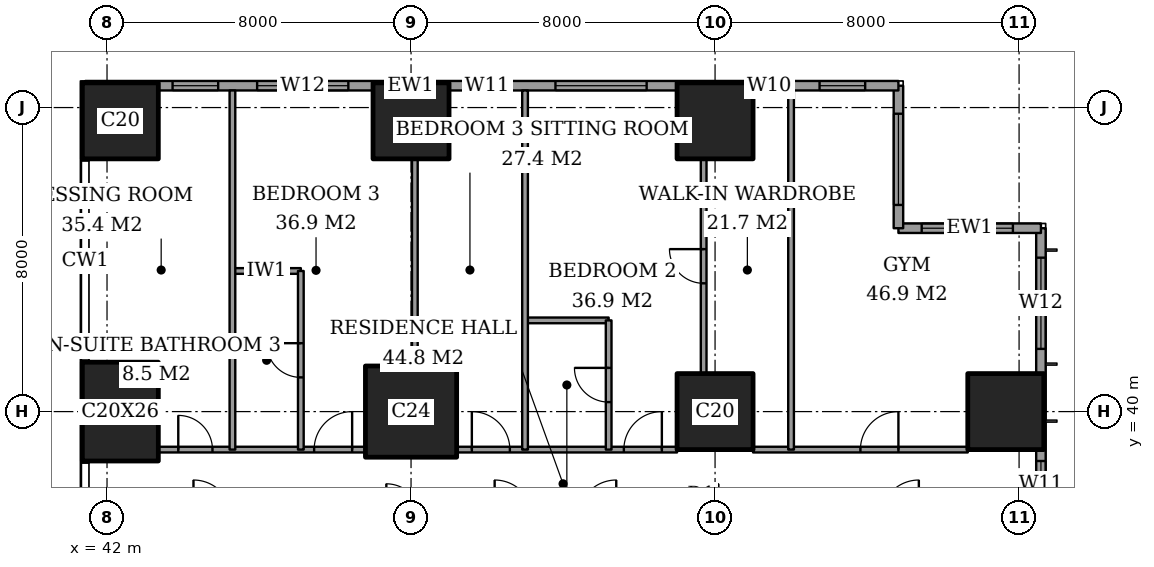
"""IFC4 building model, lengths in metres.
Left out: names, types, materials, properties, quantities, classifications, styles, units other than length and angle.
Written with IfcOpenShell. Run it as: python <this file> out.ifc"""

import sys

from ifc_helpers import new_model, si_unit, direction, frame, frame_2d, origin, origin_2d, place, context, subcontext, project, spatial, rectangle, extrude, element, fill, save


model = new_model("IFC4")
c1 = context("Model", 3, precision=1e-05, world=origin(), true_north=direction((0.0, 1.0)))
c2 = subcontext(c1, "Body", "Model", "MODEL_VIEW")
j1 = project(units=[si_unit("LENGTHUNIT", "METRE"), si_unit("PLANEANGLEUNIT", "RADIAN")], contexts=[c1])
p1 = place(None, origin())
s1 = spatial("IfcSite", under=j1, at=p1, CompositionType="ELEMENT")
p2 = place(p1, origin())
s2 = spatial("IfcBuilding", under=s1, at=p2, CompositionType="ELEMENT")
p3 = place(p2, frame((0.0, 0.0, 143.0)))
s3 = spatial("IfcBuildingStorey", under=s2, at=p3, CompositionType="ELEMENT", Elevation=143.0)
p4 = place(p3, frame((42.35, 40.0, 0.0), z_axis=(0.0, 0.0, 1.0), x_axis=(1.0, 0.0, 0.0)))
e1 = element("IfcColumn", 1, at=p4, inside=s3, PredefinedType="COLUMN", context=c2, shape_type="SweptSolid", body=[
    extrude(rectangle(XDim=2.0, YDim=2.6, at=origin_2d()), origin(), (0.0, 0.0, 1.0), 3.6),
])
p5 = place(p3, frame((42.35, 47.65, 0.0), z_axis=(0.0, 0.0, 1.0), x_axis=(1.0, 0.0, 0.0)))
e2 = element("IfcColumn", 2, at=p5, inside=s3, PredefinedType="COLUMN", context=c2, shape_type="SweptSolid", body=[
    extrude(rectangle(XDim=2.0, YDim=2.0, at=origin_2d()), origin(), (0.0, 0.0, 1.0), 3.6),
])
p6 = place(p3, frame((50.0, 40.0, 0.0), z_axis=(0.0, 0.0, 1.0), x_axis=(1.0, 0.0, 0.0)))
e3 = element("IfcColumn", 3, at=p6, inside=s3, PredefinedType="COLUMN", context=c2, shape_type="SweptSolid", body=[
    extrude(rectangle(XDim=2.4, YDim=2.4, at=origin_2d()), origin(), (0.0, 0.0, 1.0), 3.6),
])
for number, where, z_axis, x_axis in (
    (4, (50.0, 47.65, 0.0), (0.0, 0.0, 1.0), (1.0, 0.0, 0.0)),
    (5, (58.0, 40.0, 0.0), (0.0, 0.0, 1.0), (1.0, 0.0, 0.0)),
    (6, (58.0, 47.65, 0.0), (0.0, 0.0, 1.0), (1.0, 0.0, 0.0)),
    (7, (65.65, 40.0, 0.0), (0.0, 0.0, 1.0), (1.0, 0.0, 0.0)),
):
    element("IfcColumn", number, at=place(p3, frame(where, z_axis=z_axis, x_axis=x_axis)), inside=s3, PredefinedType="COLUMN", context=c2, shape_type="SweptSolid", body=[
        extrude(rectangle(XDim=2.0, YDim=2.0, at=origin_2d()), origin(), (0.0, 0.0, 1.0), 3.6),
    ])
p7 = place(p3, frame((66.575, 3.175, 0.0), z_axis=(0.0, 0.0, 1.0), x_axis=(0.0, 1.0, 0.0)))
e8 = element("IfcWall", 8, at=p7, inside=s3, PredefinedType="SOLIDWALL", context=c2, shape_type="SweptSolid", body=[
    extrude(rectangle(XDim=41.65, YDim=0.25, at=frame_2d((20.825, 0.0))), origin(), (0.0, 0.0, 1.0), 3.6),
])
p8 = place(p7, frame((0.775, 0.0, 0.4)))
e9 = element("IfcOpeningElement", 9, at=p8, cuts=e8, PredefinedType="OPENING", context=c2, shape_type="SweptSolid", body=[
    extrude(rectangle(XDim=2.4, YDim=2.2, at=frame_2d((1.2, 1.1))), frame((0.0, 0.135, 0.0), z_axis=(0.0, -1.0, 0.0), x_axis=(1.0, 0.0, 0.0)), (0.0, 0.0, 1.0), 0.27),
])
p9 = place(p7, frame((6.1, 0.0, 0.4)))
e10 = element("IfcOpeningElement", 10, at=p9, cuts=e8, PredefinedType="OPENING", context=c2, shape_type="SweptSolid", body=[
    extrude(rectangle(XDim=1.2, YDim=2.2, at=frame_2d((0.6, 1.1))), frame((0.0, 0.135, 0.0), z_axis=(0.0, -1.0, 0.0), x_axis=(1.0, 0.0, 0.0)), (0.0, 0.0, 1.0), 0.27),
])
p10 = place(p7, frame((8.275, 0.0, 0.4)))
e11 = element("IfcOpeningElement", 11, at=p10, cuts=e8, PredefinedType="OPENING", context=c2, shape_type="SweptSolid", body=[
    extrude(rectangle(XDim=2.4, YDim=2.2, at=frame_2d((1.2, 1.1))), frame((0.0, 0.135, 0.0), z_axis=(0.0, -1.0, 0.0), x_axis=(1.0, 0.0, 0.0)), (0.0, 0.0, 1.0), 0.27),
])
p11 = place(p7, frame((15.775, 0.0, 0.4)))
e12 = element("IfcOpeningElement", 12, at=p11, cuts=e8, PredefinedType="OPENING", context=c2, shape_type="SweptSolid", body=[
    extrude(rectangle(XDim=2.4, YDim=2.2, at=frame_2d((1.2, 1.1))), frame((0.0, 0.135, 0.0), z_axis=(0.0, -1.0, 0.0), x_axis=(1.0, 0.0, 0.0)), (0.0, 0.0, 1.0), 0.27),
])
p12 = place(p7, frame((23.475, 0.0, 0.4)))
e13 = element("IfcOpeningElement", 13, at=p12, cuts=e8, PredefinedType="OPENING", context=c2, shape_type="SweptSolid", body=[
    extrude(rectangle(XDim=2.4, YDim=2.2, at=frame_2d((1.2, 1.1))), frame((0.0, 0.135, 0.0), z_axis=(0.0, -1.0, 0.0), x_axis=(1.0, 0.0, 0.0)), (0.0, 0.0, 1.0), 0.27),
])
p13 = place(p7, frame((30.875, 0.0, 0.4)))
e14 = element("IfcOpeningElement", 14, at=p13, cuts=e8, PredefinedType="OPENING", context=c2, shape_type="SweptSolid", body=[
    extrude(rectangle(XDim=2.4, YDim=2.2, at=frame_2d((1.2, 1.1))), frame((0.0, 0.135, 0.0), z_axis=(0.0, -1.0, 0.0), x_axis=(1.0, 0.0, 0.0)), (0.0, 0.0, 1.0), 0.27),
])
p14 = place(p7, frame((34.325, 0.0, 0.4)))
e15 = element("IfcOpeningElement", 15, at=p14, cuts=e8, PredefinedType="OPENING", context=c2, shape_type="SweptSolid", body=[
    extrude(rectangle(XDim=1.2, YDim=2.2, at=frame_2d((0.6, 1.1))), frame((0.0, 0.135, 0.0), z_axis=(0.0, -1.0, 0.0), x_axis=(1.0, 0.0, 0.0)), (0.0, 0.0, 1.0), 0.27),
])
p15 = place(p7, frame((38.475, 0.0, 0.4)))
e16 = element("IfcOpeningElement", 16, at=p15, cuts=e8, PredefinedType="OPENING", context=c2, shape_type="SweptSolid", body=[
    extrude(rectangle(XDim=2.4, YDim=2.2, at=frame_2d((1.2, 1.1))), frame((0.0, 0.135, 0.0), z_axis=(0.0, -1.0, 0.0), x_axis=(1.0, 0.0, 0.0)), (0.0, 0.0, 1.0), 0.27),
])
p16 = place(p3, frame((66.575, 44.825, 0.0), z_axis=(0.0, 0.0, 1.0), x_axis=(-1.0, 0.0, 0.0)))
e17 = element("IfcWall", 17, at=p16, inside=s3, PredefinedType="SOLIDWALL", context=c2, shape_type="SweptSolid", body=[
    extrude(rectangle(XDim=3.75, YDim=0.25, at=frame_2d((1.875, 0.0))), origin(), (0.0, 0.0, 1.0), 3.6),
])
p17 = place(p16, frame((0.738, 0.0, 0.4)))
e18 = element("IfcOpeningElement", 18, at=p17, cuts=e17, PredefinedType="OPENING", context=c2, shape_type="SweptSolid", body=[
    extrude(rectangle(XDim=2.4, YDim=2.2, at=frame_2d((1.2, 1.1))), frame((0.0, 0.135, 0.0), z_axis=(0.0, -1.0, 0.0), x_axis=(1.0, 0.0, 0.0)), (0.0, 0.0, 1.0), 0.27),
])
p18 = place(p3, frame((62.825, 44.825, 0.0), z_axis=(0.0, 0.0, 1.0), x_axis=(0.0, 1.0, 0.0)))
e19 = element("IfcWall", 19, at=p18, inside=s3, PredefinedType="SOLIDWALL", context=c2, shape_type="SweptSolid", body=[
    extrude(rectangle(XDim=3.75, YDim=0.25, at=frame_2d((1.875, 0.0))), origin(), (0.0, 0.0, 1.0), 3.6),
])
p19 = place(p18, frame((0.613, 0.0, 0.4)))
e20 = element("IfcOpeningElement", 20, at=p19, cuts=e19, PredefinedType="OPENING", context=c2, shape_type="SweptSolid", body=[
    extrude(rectangle(XDim=2.4, YDim=2.2, at=frame_2d((1.2, 1.1))), frame((0.0, 0.135, 0.0), z_axis=(0.0, -1.0, 0.0), x_axis=(1.0, 0.0, 0.0)), (0.0, 0.0, 1.0), 0.27),
])
p20 = place(p3, frame((62.825, 48.575, 0.0), z_axis=(0.0, 0.0, 1.0), x_axis=(-1.0, 0.0, 0.0)))
e21 = element("IfcWall", 21, at=p20, inside=s3, PredefinedType="SOLIDWALL", context=c2, shape_type="SweptSolid", body=[
    extrude(rectangle(XDim=21.4, YDim=0.25, at=frame_2d((10.7, 0.0))), origin(), (0.0, 0.0, 1.0), 3.6),
])
p21 = place(p20, frame((0.875, 0.0, 0.4)))
e22 = element("IfcOpeningElement", 22, at=p21, cuts=e21, PredefinedType="OPENING", context=c2, shape_type="SweptSolid", body=[
    extrude(rectangle(XDim=1.2, YDim=2.2, at=frame_2d((0.6, 1.1))), frame((0.0, 0.135, 0.0), z_axis=(0.0, -1.0, 0.0), x_axis=(1.0, 0.0, 0.0)), (0.0, 0.0, 1.0), 0.27),
])
p22 = place(p20, frame((3.1, 0.0, 0.4)))
e23 = element("IfcOpeningElement", 23, at=p22, cuts=e21, PredefinedType="OPENING", context=c2, shape_type="SweptSolid", body=[
    extrude(rectangle(XDim=0.6, YDim=2.2, at=frame_2d((0.3, 1.1))), frame((0.0, 0.135, 0.0), z_axis=(0.0, -1.0, 0.0), x_axis=(1.0, 0.0, 0.0)), (0.0, 0.0, 1.0), 0.27),
])
p23 = place(p20, frame((6.625, 0.0, 0.4)))
e24 = element("IfcOpeningElement", 24, at=p23, cuts=e21, PredefinedType="OPENING", context=c2, shape_type="SweptSolid", body=[
    extrude(rectangle(XDim=2.4, YDim=2.2, at=frame_2d((1.2, 1.1))), frame((0.0, 0.135, 0.0), z_axis=(0.0, -1.0, 0.0), x_axis=(1.0, 0.0, 0.0)), (0.0, 0.0, 1.0), 0.27),
])
p24 = place(p20, frame((10.225, 0.0, 0.4)))
e25 = element("IfcOpeningElement", 25, at=p24, cuts=e21, PredefinedType="OPENING", context=c2, shape_type="SweptSolid", body=[
    extrude(rectangle(XDim=1.2, YDim=2.2, at=frame_2d((0.6, 1.1))), frame((0.0, 0.135, 0.0), z_axis=(0.0, -1.0, 0.0), x_axis=(1.0, 0.0, 0.0)), (0.0, 0.0, 1.0), 0.27),
])
p25 = place(p20, frame((14.475, 0.0, 0.4)))
e26 = element("IfcOpeningElement", 26, at=p25, cuts=e21, PredefinedType="OPENING", context=c2, shape_type="SweptSolid", body=[
    extrude(rectangle(XDim=2.4, YDim=2.2, at=frame_2d((1.2, 1.1))), frame((0.0, 0.135, 0.0), z_axis=(0.0, -1.0, 0.0), x_axis=(1.0, 0.0, 0.0)), (0.0, 0.0, 1.0), 0.27),
])
p26 = place(p20, frame((17.9, 0.0, 0.4)))
e27 = element("IfcOpeningElement", 27, at=p26, cuts=e21, PredefinedType="OPENING", context=c2, shape_type="SweptSolid", body=[
    extrude(rectangle(XDim=1.2, YDim=2.2, at=frame_2d((0.6, 1.1))), frame((0.0, 0.135, 0.0), z_axis=(0.0, -1.0, 0.0), x_axis=(1.0, 0.0, 0.0)), (0.0, 0.0, 1.0), 0.27),
])
p27 = place(p3, frame((43.35, 39.0, 0.0), z_axis=(0.0, 0.0, 1.0), x_axis=(1.0, 0.0, 0.0)))
e28 = element("IfcWall", 28, at=p27, inside=s3, PredefinedType="PARTITIONING", context=c2, shape_type="SweptSolid", body=[
    extrude(rectangle(XDim=5.45, YDim=0.15, at=frame_2d((2.725, 0.0))), origin(), (0.0, 0.0, 1.0), 3.35),
])
p28 = place(p27, frame((4.1, 0.0, 0.0)))
e29 = element("IfcOpeningElement", 29, at=p28, cuts=e28, PredefinedType="OPENING", context=c2, shape_type="SweptSolid", body=[
    extrude(rectangle(XDim=1.0, YDim=2.1, at=frame_2d((0.5, 1.05))), frame((0.0, 0.085, 0.0), z_axis=(0.0, -1.0, 0.0), x_axis=(1.0, 0.0, 0.0)), (0.0, 0.0, 1.0), 0.17),
])
p29 = place(p27, frame((0.525, 0.0, 0.0)))
e30 = element("IfcOpeningElement", 30, at=p29, cuts=e28, PredefinedType="OPENING", context=c2, shape_type="SweptSolid", body=[
    extrude(rectangle(XDim=0.9, YDim=2.1, at=frame_2d((0.45, 1.05))), frame((0.0, 0.085, 0.0), z_axis=(0.0, -1.0, 0.0), x_axis=(1.0, 0.0, 0.0)), (0.0, 0.0, 1.0), 0.17),
])
p30 = place(p3, frame((51.2, 39.0, 0.0), z_axis=(0.0, 0.0, 1.0), x_axis=(1.0, 0.0, 0.0)))
e31 = element("IfcWall", 31, at=p30, inside=s3, PredefinedType="PARTITIONING", context=c2, shape_type="SweptSolid", body=[
    extrude(rectangle(XDim=5.8, YDim=0.15, at=frame_2d((2.9, 0.0))), origin(), (0.0, 0.0, 1.0), 3.35),
])
p31 = place(p30, frame((4.4, 0.0, 0.0)))
e32 = element("IfcOpeningElement", 32, at=p31, cuts=e31, PredefinedType="OPENING", context=c2, shape_type="SweptSolid", body=[
    extrude(rectangle(XDim=1.0, YDim=2.1, at=frame_2d((0.5, 1.05))), frame((0.0, 0.085, 0.0), z_axis=(0.0, -1.0, 0.0), x_axis=(1.0, 0.0, 0.0)), (0.0, 0.0, 1.0), 0.17),
])
p32 = place(p30, frame((0.4, 0.0, 0.0)))
e33 = element("IfcOpeningElement", 33, at=p32, cuts=e31, PredefinedType="OPENING", context=c2, shape_type="SweptSolid", body=[
    extrude(rectangle(XDim=1.0, YDim=2.1, at=frame_2d((0.5, 1.05))), frame((0.0, 0.085, 0.0), z_axis=(0.0, -1.0, 0.0), x_axis=(1.0, 0.0, 0.0)), (0.0, 0.0, 1.0), 0.17),
])
p33 = place(p3, frame((59.0, 39.0, 0.0), z_axis=(0.0, 0.0, 1.0), x_axis=(1.0, 0.0, 0.0)))
e34 = element("IfcWall", 34, at=p33, inside=s3, PredefinedType="PARTITIONING", context=c2, shape_type="SweptSolid", body=[
    extrude(rectangle(XDim=5.65, YDim=0.15, at=frame_2d((2.825, 0.0))), origin(), (0.0, 0.0, 1.0), 3.35),
])
p34 = place(p33, frame((2.825, 0.0, 0.0)))
e35 = element("IfcOpeningElement", 35, at=p34, cuts=e34, PredefinedType="OPENING", context=c2, shape_type="SweptSolid", body=[
    extrude(rectangle(XDim=1.0, YDim=2.1, at=frame_2d((0.5, 1.05))), frame((0.0, 0.085, 0.0), z_axis=(0.0, -1.0, 0.0), x_axis=(1.0, 0.0, 0.0)), (0.0, 0.0, 1.0), 0.17),
])
p35 = place(p3, frame((53.0, 42.4, 0.0), z_axis=(0.0, 0.0, 1.0), x_axis=(1.0, 0.0, 0.0)))
e36 = element("IfcWall", 36, at=p35, inside=s3, PredefinedType="PARTITIONING", context=c2, shape_type="SweptSolid", body=[
    extrude(rectangle(XDim=2.2, YDim=0.15, at=frame_2d((1.1, 0.0))), origin(), (0.0, 0.0, 1.0), 3.35),
])
p36 = place(p3, frame((45.3, 43.7, 0.0), z_axis=(0.0, 0.0, 1.0), x_axis=(1.0, 0.0, 0.0)))
e37 = element("IfcWall", 37, at=p36, inside=s3, PredefinedType="PARTITIONING", context=c2, shape_type="SweptSolid", body=[
    extrude(rectangle(XDim=1.8, YDim=0.15, at=frame_2d((0.9, 0.0))), origin(), (0.0, 0.0, 1.0), 3.35),
])
p37 = place(p3, frame((45.3, 39.0, 0.0), z_axis=(0.0, 0.0, 1.0), x_axis=(0.0, 1.0, 0.0)))
e38 = element("IfcWall", 38, at=p37, inside=s3, PredefinedType="PARTITIONING", context=c2, shape_type="SweptSolid", body=[
    extrude(rectangle(XDim=9.45, YDim=0.15, at=frame_2d((4.725, 0.0))), origin(), (0.0, 0.0, 1.0), 3.35),
])
p38 = place(p3, frame((47.1, 39.0, 0.0), z_axis=(0.0, 0.0, 1.0), x_axis=(0.0, 1.0, 0.0)))
e39 = element("IfcWall", 39, at=p38, inside=s3, PredefinedType="PARTITIONING", context=c2, shape_type="SweptSolid", body=[
    extrude(rectangle(XDim=4.7, YDim=0.15, at=frame_2d((2.35, 0.0))), origin(), (0.0, 0.0, 1.0), 3.35),
])
p39 = place(p38, frame((1.9, 0.0, 0.0)))
e40 = element("IfcOpeningElement", 40, at=p39, cuts=e39, PredefinedType="OPENING", context=c2, shape_type="SweptSolid", body=[
    extrude(rectangle(XDim=0.9, YDim=2.1, at=frame_2d((0.45, 1.05))), frame((0.0, 0.085, 0.0), z_axis=(0.0, -1.0, 0.0), x_axis=(1.0, 0.0, 0.0)), (0.0, 0.0, 1.0), 0.17),
])
p40 = place(p3, frame((50.1, 41.2, 0.0), z_axis=(0.0, 0.0, 1.0), x_axis=(0.0, 1.0, 0.0)))
e41 = element("IfcWall", 41, at=p40, inside=s3, PredefinedType="PARTITIONING", context=c2, shape_type="SweptSolid", body=[
    extrude(rectangle(XDim=5.45, YDim=0.15, at=frame_2d((2.725, 0.0))), origin(), (0.0, 0.0, 1.0), 3.35),
])
p41 = place(p3, frame((53.0, 39.0, 0.0), z_axis=(0.0, 0.0, 1.0), x_axis=(0.0, 1.0, 0.0)))
e42 = element("IfcWall", 42, at=p41, inside=s3, PredefinedType="PARTITIONING", context=c2, shape_type="SweptSolid", body=[
    extrude(rectangle(XDim=9.45, YDim=0.15, at=frame_2d((4.725, 0.0))), origin(), (0.0, 0.0, 1.0), 3.35),
])
p42 = place(p3, frame((55.2, 39.0, 0.0), z_axis=(0.0, 0.0, 1.0), x_axis=(0.0, 1.0, 0.0)))
e43 = element("IfcWall", 43, at=p42, inside=s3, PredefinedType="PARTITIONING", context=c2, shape_type="SweptSolid", body=[
    extrude(rectangle(XDim=3.4, YDim=0.15, at=frame_2d((1.7, 0.0))), origin(), (0.0, 0.0, 1.0), 3.35),
])
p43 = place(p42, frame((1.25, 0.0, 0.0)))
e44 = element("IfcOpeningElement", 44, at=p43, cuts=e43, PredefinedType="OPENING", context=c2, shape_type="SweptSolid", body=[
    extrude(rectangle(XDim=0.9, YDim=2.1, at=frame_2d((0.45, 1.05))), frame((0.0, 0.085, 0.0), z_axis=(0.0, -1.0, 0.0), x_axis=(1.0, 0.0, 0.0)), (0.0, 0.0, 1.0), 0.17),
])
p44 = place(p3, frame((57.7, 41.0, 0.0), z_axis=(0.0, 0.0, 1.0), x_axis=(0.0, 1.0, 0.0)))
e45 = element("IfcWall", 45, at=p44, inside=s3, PredefinedType="PARTITIONING", context=c2, shape_type="SweptSolid", body=[
    extrude(rectangle(XDim=5.65, YDim=0.15, at=frame_2d((2.825, 0.0))), origin(), (0.0, 0.0, 1.0), 3.35),
])
p45 = place(p44, frame((2.375, 0.0, 0.0)))
e46 = element("IfcOpeningElement", 46, at=p45, cuts=e45, PredefinedType="OPENING", context=c2, shape_type="SweptSolid", body=[
    extrude(rectangle(XDim=0.9, YDim=2.1, at=frame_2d((0.45, 1.05))), frame((0.0, 0.085, 0.0), z_axis=(0.0, -1.0, 0.0), x_axis=(1.0, 0.0, 0.0)), (0.0, 0.0, 1.0), 0.17),
])
p46 = place(p3, frame((60.0, 39.0, 0.0), z_axis=(0.0, 0.0, 1.0), x_axis=(0.0, 1.0, 0.0)))
e47 = element("IfcWall", 47, at=p46, inside=s3, PredefinedType="PARTITIONING", context=c2, shape_type="SweptSolid", body=[
    extrude(rectangle(XDim=9.45, YDim=0.15, at=frame_2d((4.725, 0.0))), origin(), (0.0, 0.0, 1.0), 3.35),
])
p47 = place(p14, origin())
e48 = element("IfcWindow", 48, at=p47, inside=s3, PartitioningType="SINGLE_PANEL", PredefinedType="WINDOW", context=c2, shape_type="SweptSolid", body=[
    extrude(rectangle(XDim=1.2, YDim=2.2, at=frame_2d((0.6, 1.1))), frame((0.0, 0.03, 0.0), z_axis=(0.0, -1.0, 0.0), x_axis=(1.0, 0.0, 0.0)), (0.0, 0.0, 1.0), 0.06),
])
fill(e15, e48)
p48 = place(p15, origin())
e49 = element("IfcWindow", 49, at=p48, inside=s3, PartitioningType="SINGLE_PANEL", PredefinedType="WINDOW", context=c2, shape_type="SweptSolid", body=[
    extrude(rectangle(XDim=2.4, YDim=2.2, at=frame_2d((1.2, 1.1))), frame((0.0, 0.03, 0.0), z_axis=(0.0, -1.0, 0.0), x_axis=(1.0, 0.0, 0.0)), (0.0, 0.0, 1.0), 0.06),
])
fill(e16, e49)
p49 = place(p17, origin())
e50 = element("IfcWindow", 50, at=p49, inside=s3, PartitioningType="SINGLE_PANEL", PredefinedType="WINDOW", context=c2, shape_type="SweptSolid", body=[
    extrude(rectangle(XDim=2.4, YDim=2.2, at=frame_2d((1.2, 1.1))), frame((0.0, 0.03, 0.0), z_axis=(0.0, -1.0, 0.0), x_axis=(1.0, 0.0, 0.0)), (0.0, 0.0, 1.0), 0.06),
])
fill(e18, e50)
p50 = place(p19, origin())
e51 = element("IfcWindow", 51, at=p50, inside=s3, PartitioningType="SINGLE_PANEL", PredefinedType="WINDOW", context=c2, shape_type="SweptSolid", body=[
    extrude(rectangle(XDim=2.4, YDim=2.2, at=frame_2d((1.2, 1.1))), frame((0.0, 0.03, 0.0), z_axis=(0.0, -1.0, 0.0), x_axis=(1.0, 0.0, 0.0)), (0.0, 0.0, 1.0), 0.06),
])
fill(e20, e51)
p51 = place(p21, origin())
e52 = element("IfcWindow", 52, at=p51, inside=s3, PartitioningType="SINGLE_PANEL", PredefinedType="WINDOW", context=c2, shape_type="SweptSolid", body=[
    extrude(rectangle(XDim=1.2, YDim=2.2, at=frame_2d((0.6, 1.1))), frame((0.0, 0.03, 0.0), z_axis=(0.0, -1.0, 0.0), x_axis=(1.0, 0.0, 0.0)), (0.0, 0.0, 1.0), 0.06),
])
fill(e22, e52)
p52 = place(p22, origin())
e53 = element("IfcWindow", 53, at=p52, inside=s3, PartitioningType="SINGLE_PANEL", PredefinedType="WINDOW", context=c2, shape_type="SweptSolid", body=[
    extrude(rectangle(XDim=0.6, YDim=2.2, at=frame_2d((0.3, 1.1))), frame((0.0, 0.03, 0.0), z_axis=(0.0, -1.0, 0.0), x_axis=(1.0, 0.0, 0.0)), (0.0, 0.0, 1.0), 0.06),
])
fill(e23, e53)
p53 = place(p23, origin())
e54 = element("IfcWindow", 54, at=p53, inside=s3, PartitioningType="SINGLE_PANEL", PredefinedType="WINDOW", context=c2, shape_type="SweptSolid", body=[
    extrude(rectangle(XDim=2.4, YDim=2.2, at=frame_2d((1.2, 1.1))), frame((0.0, 0.03, 0.0), z_axis=(0.0, -1.0, 0.0), x_axis=(1.0, 0.0, 0.0)), (0.0, 0.0, 1.0), 0.06),
])
fill(e24, e54)
p54 = place(p24, origin())
e55 = element("IfcWindow", 55, at=p54, inside=s3, PartitioningType="SINGLE_PANEL", PredefinedType="WINDOW", context=c2, shape_type="SweptSolid", body=[
    extrude(rectangle(XDim=1.2, YDim=2.2, at=frame_2d((0.6, 1.1))), frame((0.0, 0.03, 0.0), z_axis=(0.0, -1.0, 0.0), x_axis=(1.0, 0.0, 0.0)), (0.0, 0.0, 1.0), 0.06),
])
fill(e25, e55)
p55 = place(p25, origin())
e56 = element("IfcWindow", 56, at=p55, inside=s3, PartitioningType="SINGLE_PANEL", PredefinedType="WINDOW", context=c2, shape_type="SweptSolid", body=[
    extrude(rectangle(XDim=2.4, YDim=2.2, at=frame_2d((1.2, 1.1))), frame((0.0, 0.03, 0.0), z_axis=(0.0, -1.0, 0.0), x_axis=(1.0, 0.0, 0.0)), (0.0, 0.0, 1.0), 0.06),
])
fill(e26, e56)
p56 = place(p26, origin())
e57 = element("IfcWindow", 57, at=p56, inside=s3, PartitioningType="SINGLE_PANEL", PredefinedType="WINDOW", context=c2, shape_type="SweptSolid", body=[
    extrude(rectangle(XDim=1.2, YDim=2.2, at=frame_2d((0.6, 1.1))), frame((0.0, 0.03, 0.0), z_axis=(0.0, -1.0, 0.0), x_axis=(1.0, 0.0, 0.0)), (0.0, 0.0, 1.0), 0.06),
])
fill(e27, e57)
p57 = place(p34, origin())
e58 = element("IfcDoor", 58, at=p57, inside=s3, OperationType="SINGLE_SWING_LEFT", PredefinedType="DOOR", context=c2, shape_type="SweptSolid", body=[
    extrude(rectangle(XDim=1.0, YDim=2.1, at=frame_2d((0.5, 1.05))), frame((0.0, 0.025, 0.0), z_axis=(0.0, -1.0, 0.0), x_axis=(1.0, 0.0, 0.0)), (0.0, 0.0, 1.0), 0.05),
])
fill(e35, e58)
p58 = place(p45, origin())
e59 = element("IfcDoor", 59, at=p58, inside=s3, OperationType="SINGLE_SWING_LEFT", PredefinedType="DOOR", context=c2, shape_type="SweptSolid", body=[
    extrude(rectangle(XDim=0.9, YDim=2.1, at=frame_2d((0.45, 1.05))), frame((0.0, 0.025, 0.0), z_axis=(0.0, -1.0, 0.0), x_axis=(1.0, 0.0, 0.0)), (0.0, 0.0, 1.0), 0.05),
])
fill(e46, e59)
p59 = place(p43, origin())
e60 = element("IfcDoor", 60, at=p59, inside=s3, OperationType="SINGLE_SWING_LEFT", PredefinedType="DOOR", context=c2, shape_type="SweptSolid", body=[
    extrude(rectangle(XDim=0.9, YDim=2.1, at=frame_2d((0.45, 1.05))), frame((0.0, 0.025, 0.0), z_axis=(0.0, -1.0, 0.0), x_axis=(1.0, 0.0, 0.0)), (0.0, 0.0, 1.0), 0.05),
])
fill(e44, e60)
p60 = place(p31, origin())
e61 = element("IfcDoor", 61, at=p60, inside=s3, OperationType="SINGLE_SWING_LEFT", PredefinedType="DOOR", context=c2, shape_type="SweptSolid", body=[
    extrude(rectangle(XDim=1.0, YDim=2.1, at=frame_2d((0.5, 1.05))), frame((0.0, 0.025, 0.0), z_axis=(0.0, -1.0, 0.0), x_axis=(1.0, 0.0, 0.0)), (0.0, 0.0, 1.0), 0.05),
])
fill(e32, e61)
p61 = place(p32, origin())
e62 = element("IfcDoor", 62, at=p61, inside=s3, OperationType="SINGLE_SWING_RIGHT", PredefinedType="DOOR", context=c2, shape_type="SweptSolid", body=[
    extrude(rectangle(XDim=1.0, YDim=2.1, at=frame_2d((0.5, 1.05))), frame((0.0, 0.025, 0.0), z_axis=(0.0, -1.0, 0.0), x_axis=(1.0, 0.0, 0.0)), (0.0, 0.0, 1.0), 0.05),
])
fill(e33, e62)
p62 = place(p39, origin())
e63 = element("IfcDoor", 63, at=p62, inside=s3, OperationType="SINGLE_SWING_LEFT", PredefinedType="DOOR", context=c2, shape_type="SweptSolid", body=[
    extrude(rectangle(XDim=0.9, YDim=2.1, at=frame_2d((0.45, 1.05))), frame((0.0, 0.025, 0.0), z_axis=(0.0, -1.0, 0.0), x_axis=(1.0, 0.0, 0.0)), (0.0, 0.0, 1.0), 0.05),
])
fill(e40, e63)
p63 = place(p28, origin())
e64 = element("IfcDoor", 64, at=p63, inside=s3, OperationType="SINGLE_SWING_LEFT", PredefinedType="DOOR", context=c2, shape_type="SweptSolid", body=[
    extrude(rectangle(XDim=1.0, YDim=2.1, at=frame_2d((0.5, 1.05))), frame((0.0, 0.025, 0.0), z_axis=(0.0, -1.0, 0.0), x_axis=(1.0, 0.0, 0.0)), (0.0, 0.0, 1.0), 0.05),
])
fill(e29, e64)
p64 = place(p29, origin())
e65 = element("IfcDoor", 65, at=p64, inside=s3, OperationType="SINGLE_SWING_RIGHT", PredefinedType="DOOR", context=c2, shape_type="SweptSolid", body=[
    extrude(rectangle(XDim=0.9, YDim=2.1, at=frame_2d((0.45, 1.05))), frame((0.0, 0.025, 0.0), z_axis=(0.0, -1.0, 0.0), x_axis=(1.0, 0.0, 0.0)), (0.0, 0.0, 1.0), 0.05),
])
fill(e30, e65)
save(model, sys.argv[1])
